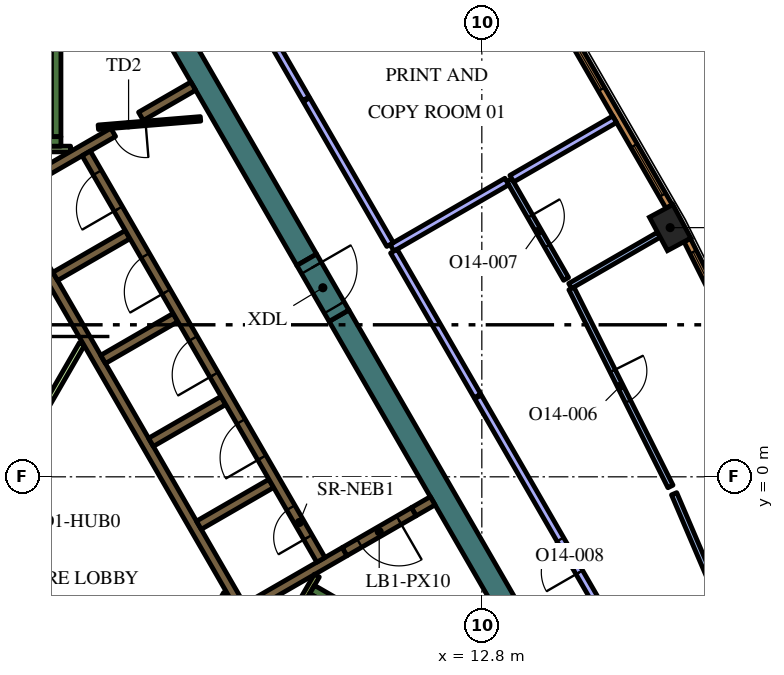
"""IFC4 building model, lengths in metres.
Left out: names, types, materials, properties, quantities, classifications, styles, units other than length and angle.
Written with IfcOpenShell. Run it as: python <this file> out.ifc"""

import sys

from ifc_helpers import new_model, si_unit, direction, frame, frame_2d, origin, origin_2d, place, context, subcontext, project, spatial, rectangle, extrude, element, fill, save


model = new_model("IFC4")
c1 = context("Model", 3, precision=1e-05, world=origin(), true_north=direction((0.0, 1.0)))
c2 = subcontext(c1, "Body", "Model", "MODEL_VIEW")
j1 = project(units=[si_unit("LENGTHUNIT", "METRE"), si_unit("PLANEANGLEUNIT", "RADIAN")], contexts=[c1])
p1 = place(None, origin())
s1 = spatial("IfcSite", under=j1, at=p1, CompositionType="ELEMENT")
p2 = place(p1, origin())
s2 = spatial("IfcBuilding", under=s1, at=p2, CompositionType="ELEMENT")
p3 = place(p2, frame((0.0, 0.0, 309.0)))
s3 = spatial("IfcBuildingStorey", under=s2, at=p3, CompositionType="ELEMENT", Elevation=309.0)
p4 = place(p3, frame((17.756, 6.557, 0.0), z_axis=(0.0, 0.0, 1.0), x_axis=(-0.473945287575, 0.880554293832, 0.0)))
e1 = element("IfcColumn", 1, at=p4, inside=s3, PredefinedType="COLUMN", context=c2, shape_type="SweptSolid", body=[
    extrude(rectangle(XDim=1.0, YDim=0.7, at=origin_2d()), origin(), (0.0, 0.0, 1.0), 4.2),
])
for number, where, z_axis, x_axis in (
    (2, (9.042, 4.239, 0.0), (0.0, 0.0, 1.0), (0.5, -0.866, 0.0)),
    (3, (1.989, 16.456, 0.0), (0.0, 0.0, 1.0), (0.5, -0.866, 0.0)),
):
    element("IfcWall", number, at=place(p3, frame(where, z_axis=z_axis, x_axis=x_axis)), inside=s3, PredefinedType="SOLIDWALL", context=c2, shape_type="SweptSolid", body=[
        extrude(rectangle(XDim=12.406, YDim=0.6, at=frame_2d((6.203, 0.0))), origin(), (0.0, 0.0, 1.0), 4.2),
    ])
p5 = place(p3, frame((8.334, -2.964, 0.0), z_axis=(0.0, 0.0, 1.0), x_axis=(0.866016039709, -0.500016218704, 0.0)))
e4 = element("IfcWall", 4, at=p5, inside=s3, PredefinedType="SOLIDWALL", context=c2, shape_type="SweptSolid", body=[
    extrude(rectangle(XDim=7.05, YDim=0.25, at=frame_2d((3.525, 0.0))), origin(), (0.0, 0.0, 1.0), 4.2),
])
p6 = place(p3, frame((8.168, -3.503, 0.0), z_axis=(0.0, 0.0, 1.0), x_axis=(0.49972245349, 0.866185586049, 0.0)))
e5 = element("IfcWall", 5, at=p6, inside=s3, PredefinedType="SOLIDWALL", context=c2, shape_type="SweptSolid", body=[
    extrude(rectangle(XDim=0.425, YDim=0.25, at=frame_2d((0.212, 0.0))), origin(), (0.0, 0.0, 1.0), 4.2),
])
p7 = place(p3, frame((1.6, 8.95, 0.0), z_axis=(0.0, 0.0, 1.0), x_axis=(0.0, 1.0, 0.0)))
e6 = element("IfcWall", 6, at=p7, inside=s3, PredefinedType="SOLIDWALL", context=c2, shape_type="SweptSolid", body=[
    extrude(rectangle(XDim=6.8, YDim=0.25, at=frame_2d((3.4, 0.0))), origin(), (0.0, 0.0, 1.0), 4.2),
])
p8 = place(p3, frame((1.05, 8.825, 0.0), z_axis=(0.0, 0.0, 1.0), x_axis=(1.0, 0.0, 0.0)))
e7 = element("IfcWall", 7, at=p8, inside=s3, PredefinedType="SOLIDWALL", context=c2, shape_type="SweptSolid", body=[
    extrude(rectangle(XDim=0.675, YDim=0.25, at=frame_2d((0.337, 0.0))), origin(), (0.0, 0.0, 1.0), 4.2),
])
p9 = place(p3, frame((11.507, -0.631, 0.0), z_axis=(0.0, 0.0, 1.0), x_axis=(-0.866093731455, -0.499881634324, 0.0)))
e8 = element("IfcWall", 8, at=p9, inside=s3, PredefinedType="SOLIDWALL", context=c2, shape_type="SweptSolid", body=[
    extrude(rectangle(XDim=0.575, YDim=0.25, at=frame_2d((0.288, 0.0))), origin(), (0.0, 0.0, 1.0), 4.2),
])
p10 = place(p3, frame((6.568, -3.627, 0.0), z_axis=(0.0, 0.0, 1.0), x_axis=(-0.499999455981, 0.866025717874, 0.0)))
e9 = element("IfcWall", 9, at=p10, inside=s3, PredefinedType="SOLIDWALL", context=c2, shape_type="SweptSolid", body=[
    extrude(rectangle(XDim=11.978, YDim=0.25, at=frame_2d((5.989, 0.0))), origin(), (0.0, 0.0, 1.0), 4.2),
])
p11 = place(p3, frame((3.1, 9.064, 0.0), z_axis=(0.0, 0.0, 1.0), x_axis=(-0.866030133475, -0.499991807846, 0.0)))
e10 = element("IfcWall", 10, at=p11, inside=s3, PredefinedType="SOLIDWALL", context=c2, shape_type="SweptSolid", body=[
    extrude(rectangle(XDim=3.217, YDim=0.25, at=frame_2d((1.608, 0.0))), origin(), (0.0, 0.0, 1.0), 4.2),
])
p12 = place(p3, frame((1.574, 5.274, 0.0), z_axis=(0.0, 0.0, 1.0), x_axis=(0.866028486751, 0.499994660107, 0.0)))
e11 = element("IfcWall", 11, at=p12, inside=s3, PredefinedType="SOLIDWALL", context=c2, shape_type="SweptSolid", body=[
    extrude(rectangle(XDim=2.2, YDim=0.25, at=frame_2d((1.1, 0.0))), origin(), (0.0, 0.0, 1.0), 4.2),
])
for number, where, z_axis, x_axis in (
    (12, (2.834, 3.091, 0.0), (0.0, 0.0, 1.0), (0.866, 0.5, 0.0)),
    (13, (4.094, 0.909, 0.0), (0.0, 0.0, 1.0), (0.866, 0.5, 0.0)),
    (14, (5.354, -1.274, 0.0), (0.0, 0.0, 1.0), (0.866, 0.5, 0.0)),
):
    element("IfcWall", number, at=place(p3, frame(where, z_axis=z_axis, x_axis=x_axis)), inside=s3, PredefinedType="SOLIDWALL", context=c2, shape_type="SweptSolid", body=[
        extrude(rectangle(XDim=2.2, YDim=0.25, at=frame_2d((1.1, 0.0))), origin(), (0.0, 0.0, 1.0), 4.2),
    ])
p13 = place(p3, frame((6.614, -3.456, 0.0), z_axis=(0.0, 0.0, 1.0), x_axis=(0.866032512851, 0.499987686533, 0.0)))
e15 = element("IfcWall", 15, at=p13, inside=s3, PredefinedType="SOLIDWALL", context=c2, shape_type="SweptSolid", body=[
    extrude(rectangle(XDim=2.975, YDim=0.25, at=frame_2d((1.487, 0.0))), origin(), (0.0, 0.0, 1.0), 4.2),
])
p14 = place(p3, frame((3.83, 9.486, 0.0), z_axis=(0.0, 0.0, 1.0), x_axis=(0.865986202621, 0.500067892261, 0.0)))
e16 = element("IfcWall", 16, at=p14, inside=s3, PredefinedType="SOLIDWALL", context=c2, shape_type="SweptSolid", body=[
    extrude(rectangle(XDim=1.591, YDim=0.25, at=frame_2d((0.795, 0.0))), origin(), (0.0, 0.0, 1.0), 4.2),
])
p15 = place(p3, frame((1.05, 8.625, 0.0), z_axis=(0.0, 0.0, 1.0), x_axis=(1.0, 0.0, 0.0)))
e17 = element("IfcWall", 17, at=p15, inside=s3, PredefinedType="PARTITIONING", context=c2, shape_type="SweptSolid", body=[
    extrude(rectangle(XDim=0.929, YDim=0.15, at=frame_2d((0.464, 0.0))), origin(), (0.0, 0.0, 1.0), 3.55),
])
p16 = place(p3, frame((8.459, -2.599, 0.0), z_axis=(0.0, 0.0, 1.0), x_axis=(-0.500041054325, -0.866001699761, 0.0)))
e18 = element("IfcWall", 18, at=p16, inside=s3, PredefinedType="PARTITIONING", context=c2, shape_type="SweptSolid", body=[
    extrude(rectangle(XDim=0.929, YDim=0.15, at=frame_2d((0.464, 0.0))), origin(), (0.0, 0.0, 1.0), 4.2),
])
p17 = place(p3, frame((5.705, -3.718, 0.0), z_axis=(0.0, 0.0, 1.0), x_axis=(0.499962090823, 0.866047289552, 0.0)))
e19 = element("IfcWall", 19, at=p17, inside=s3, PredefinedType="PARTITIONING", context=c2, shape_type="SweptSolid", body=[
    extrude(rectangle(XDim=0.735, YDim=0.15, at=frame_2d((0.367, 0.0))), origin(), (0.0, 0.0, 1.0), 3.55),
])
p18 = place(p3, frame((0.72, 0.797, 0.0), z_axis=(0.0, 0.0, 1.0), x_axis=(0.499984921984, 0.866034108906, 0.0)))
e20 = element("IfcWall", 20, at=p18, inside=s3, PredefinedType="PARTITIONING", context=c2, shape_type="SweptSolid", body=[
    extrude(rectangle(XDim=3.113, YDim=0.15, at=frame_2d((1.557, 0.0))), origin(), (0.0, 0.0, 1.0), 3.55),
])
p19 = place(p3, frame((8.565, -2.185, 0.0), z_axis=(0.0, 0.0, 1.0), x_axis=(-0.499997954832, 0.866026584559, 0.0)))
e21 = element("IfcWall", 21, at=p19, inside=s3, PredefinedType="SOLIDWALL", context=c2, shape_type="SweptSolid", body=[
    extrude(rectangle(XDim=12.35, YDim=0.25, at=frame_2d((6.175, 0.0))), origin(), (0.0, 0.0, 1.0), 4.2),
])
p20 = place(p19, frame((0.685, 0.0, 0.0)))
e22 = element("IfcOpeningElement", 22, at=p20, cuts=e21, PredefinedType="OPENING", context=c2, shape_type="SweptSolid", body=[
    extrude(rectangle(XDim=0.9, YDim=2.1, at=frame_2d((0.45, 1.05))), frame((0.0, 0.135, 0.0), z_axis=(0.0, -1.0, 0.0), x_axis=(1.0, 0.0, 0.0)), (0.0, 0.0, 1.0), 0.27),
])
p21 = place(p19, frame((3.105, 0.0, 0.0)))
e23 = element("IfcOpeningElement", 23, at=p21, cuts=e21, PredefinedType="OPENING", context=c2, shape_type="SweptSolid", body=[
    extrude(rectangle(XDim=1.1, YDim=2.1, at=frame_2d((0.55, 1.05))), frame((0.0, 0.135, 0.0), z_axis=(0.0, -1.0, 0.0), x_axis=(1.0, 0.0, 0.0)), (0.0, 0.0, 1.0), 0.27),
])
p22 = place(p19, frame((5.625, 0.0, 0.0)))
e24 = element("IfcOpeningElement", 24, at=p22, cuts=e21, PredefinedType="OPENING", context=c2, shape_type="SweptSolid", body=[
    extrude(rectangle(XDim=1.1, YDim=2.1, at=frame_2d((0.55, 1.05))), frame((0.0, 0.135, 0.0), z_axis=(0.0, -1.0, 0.0), x_axis=(1.0, 0.0, 0.0)), (0.0, 0.0, 1.0), 0.27),
])
p23 = place(p19, frame((8.145, 0.0, 0.0)))
e25 = element("IfcOpeningElement", 25, at=p23, cuts=e21, PredefinedType="OPENING", context=c2, shape_type="SweptSolid", body=[
    extrude(rectangle(XDim=1.1, YDim=2.1, at=frame_2d((0.55, 1.05))), frame((0.0, 0.135, 0.0), z_axis=(0.0, -1.0, 0.0), x_axis=(1.0, 0.0, 0.0)), (0.0, 0.0, 1.0), 0.27),
])
p24 = place(p19, frame((10.665, 0.0, 0.0)))
e26 = element("IfcOpeningElement", 26, at=p24, cuts=e21, PredefinedType="OPENING", context=c2, shape_type="SweptSolid", body=[
    extrude(rectangle(XDim=1.1, YDim=2.1, at=frame_2d((0.55, 1.05))), frame((0.0, 0.135, 0.0), z_axis=(0.0, -1.0, 0.0), x_axis=(1.0, 0.0, 0.0)), (0.0, 0.0, 1.0), 0.27),
])
p25 = place(p3, frame((5.398, 9.419, 0.0), z_axis=(0.0, 0.0, 1.0), x_axis=(-0.996653416376, -0.081743303248, 0.0)))
e27 = element("IfcWall", 27, at=p25, inside=s3, PredefinedType="PARTITIONING", context=c2, shape_type="SweptSolid", body=[
    extrude(rectangle(XDim=2.7, YDim=0.12, at=frame_2d((1.35, 0.0))), origin(), (0.0, 0.0, 1.0), 3.55),
])
p26 = place(p25, frame((1.45, 0.0, 0.0)))
e28 = element("IfcOpeningElement", 28, at=p26, cuts=e27, PredefinedType="OPENING", context=c2, shape_type="SweptSolid", body=[
    extrude(rectangle(XDim=0.9, YDim=2.1, at=frame_2d((0.45, 1.05))), frame((0.0, 0.07, 0.0), z_axis=(0.0, -1.0, 0.0), x_axis=(1.0, 0.0, 0.0)), (0.0, 0.0, 1.0), 0.14),
])
p27 = place(p3, frame((11.009, -0.919, 0.0), z_axis=(0.0, 0.0, 1.0), x_axis=(-0.866059744384, -0.49994051562, 0.0)))
e29 = element("IfcWall", 29, at=p27, inside=s3, PredefinedType="SOLIDWALL", context=c2, shape_type="SweptSolid", body=[
    extrude(rectangle(XDim=2.1, YDim=0.25, at=frame_2d((1.05, 0.0))), origin(), (0.0, 0.0, 1.0), 4.2),
])
p28 = place(p27, frame((0.45, 0.0, 0.0)))
e30 = element("IfcOpeningElement", 30, at=p28, cuts=e29, PredefinedType="OPENING", context=c2, shape_type="SweptSolid", body=[
    extrude(rectangle(XDim=1.2, YDim=2.1, at=frame_2d((0.6, 1.05))), frame((0.0, 0.135, 0.0), z_axis=(0.0, -1.0, 0.0), x_axis=(1.0, 0.0, 0.0)), (0.0, 0.0, 1.0), 0.27),
])
p29 = place(p3, frame((8.192, 5.711, 0.0), z_axis=(0.0, 0.0, 1.0), x_axis=(0.500062241894, -0.865989465428, 0.0)))
e31 = element("IfcWall", 31, at=p29, inside=s3, PredefinedType="SOLIDWALL", context=c2, shape_type="SweptSolid", body=[
    extrude(rectangle(XDim=1.7, YDim=0.6, at=frame_2d((0.85, 0.0))), origin(), (0.0, 0.0, 1.0), 4.2),
])
p30 = place(p29, frame((0.25, 0.0, 0.0)))
e32 = element("IfcOpeningElement", 32, at=p30, cuts=e31, PredefinedType="OPENING", context=c2, shape_type="SweptSolid", body=[
    extrude(rectangle(XDim=1.2, YDim=2.1, at=frame_2d((0.6, 1.05))), frame((0.0, 0.31, 0.0), z_axis=(0.0, -1.0, 0.0), x_axis=(1.0, 0.0, 0.0)), (0.0, 0.0, 1.0), 0.62),
])
p31 = place(p3, frame((15.124, 5.022, 0.0), z_axis=(0.0, 0.0, 1.0), x_axis=(0.866010629317, 0.500025589255, 0.0)))
e33 = element("IfcWall", 33, at=p31, inside=s3, PredefinedType="PARTITIONING", context=c2, shape_type="SweptSolid", body=[
    extrude(rectangle(XDim=2.696, YDim=0.15, at=frame_2d((1.348, 0.0))), origin(), (0.0, 0.0, 1.0), 3.55),
])
p32 = place(p3, frame((19.226, -3.639, 0.0), z_axis=(0.0, 0.0, 1.0), x_axis=(-0.393350933662, 0.919388407033, 0.0)))
e34 = element("IfcWall", 34, at=p32, inside=s3, PredefinedType="PARTITIONING", context=c2, shape_type="SweptSolid", body=[
    extrude(rectangle(XDim=3.474, YDim=0.15, at=frame_2d((1.737, 0.0))), origin(), (0.0, 0.0, 1.0), 3.55),
])
p33 = place(p3, frame((15.158, 4.955, 0.0), z_axis=(0.0, 0.0, 1.0), x_axis=(0.447465104013, -0.894301392535, 0.0)))
e35 = element("IfcWall", 35, at=p33, inside=s3, PredefinedType="PARTITIONING", context=c2, shape_type="SweptSolid", body=[
    extrude(rectangle(XDim=5.824, YDim=0.15, at=frame_2d((2.912, 0.0))), origin(), (0.0, 0.0, 1.0), 3.55),
])
p34 = place(p33, frame((2.424, 0.0, 0.0)))
e36 = element("IfcOpeningElement", 36, at=p34, cuts=e35, PredefinedType="OPENING", context=c2, shape_type="SweptSolid", body=[
    extrude(rectangle(XDim=0.9, YDim=2.1, at=frame_2d((0.45, 1.05))), frame((0.0, 0.085, 0.0), z_axis=(0.0, -1.0, 0.0), x_axis=(1.0, 0.0, 0.0)), (0.0, 0.0, 1.0), 0.17),
])
p35 = place(p3, frame((13.523, 7.808, 0.0), z_axis=(0.0, 0.0, 1.0), x_axis=(0.498338040698, -0.866982812513, 0.0)))
e37 = element("IfcWall", 37, at=p35, inside=s3, PredefinedType="PARTITIONING", context=c2, shape_type="SweptSolid", body=[
    extrude(rectangle(XDim=2.999, YDim=0.15, at=frame_2d((1.5, 0.0))), origin(), (0.0, 0.0, 1.0), 3.55),
])
p36 = place(p35, frame((1.099, 0.0, 0.0)))
e38 = element("IfcOpeningElement", 38, at=p36, cuts=e37, PredefinedType="OPENING", context=c2, shape_type="SweptSolid", body=[
    extrude(rectangle(XDim=0.9, YDim=2.1, at=frame_2d((0.45, 1.05))), frame((0.0, 0.085, 0.0), z_axis=(0.0, -1.0, 0.0), x_axis=(1.0, 0.0, 0.0)), (0.0, 0.0, 1.0), 0.17),
])
p37 = place(p3, frame((13.588, 7.845, 0.0), z_axis=(0.0, 0.0, 1.0), x_axis=(0.866022959057, 0.500004234368, 0.0)))
e39 = element("IfcWall", 39, at=p37, inside=s3, PredefinedType="PARTITIONING", context=c2, shape_type="SweptSolid", body=[
    extrude(rectangle(XDim=3.125, YDim=0.2, at=frame_2d((1.562, 0.0))), origin(), (0.0, 0.0, 1.0), 3.55),
])
p38 = place(p3, frame((10.436, 6.025, 0.0), z_axis=(0.0, 0.0, 1.0), x_axis=(0.866030664334, 0.49999088835, 0.0)))
e40 = element("IfcWall", 40, at=p38, inside=s3, PredefinedType="PARTITIONING", context=c2, shape_type="SweptSolid", body=[
    extrude(rectangle(XDim=3.49, YDim=0.2, at=frame_2d((1.745, 0.0))), origin(), (0.0, 0.0, 1.0), 3.55),
])
p39 = place(p3, frame((12.686, 2.128, 0.0), z_axis=(0.0, 0.0, 1.0), x_axis=(-0.499988222896, 0.866032203192, 0.0)))
e41 = element("IfcWall", 41, at=p39, inside=s3, PredefinedType="PARTITIONING", context=c2, shape_type="SweptSolid", body=[
    extrude(rectangle(XDim=4.4, YDim=0.2, at=frame_2d((2.2, 0.0))), origin(), (0.0, 0.0, 1.0), 3.55),
])
p40 = place(p3, frame((17.565, -6.324, 0.0), z_axis=(0.0, 0.0, 1.0), x_axis=(-0.499990354792, 0.866030972376, 0.0)))
e42 = element("IfcWall", 42, at=p40, inside=s3, PredefinedType="PARTITIONING", context=c2, shape_type="SweptSolid", body=[
    extrude(rectangle(XDim=9.729, YDim=0.2, at=frame_2d((4.865, 0.0))), origin(), (0.0, 0.0, 1.0), 3.55),
])
p41 = place(p40, frame((4.4, 0.0, 0.0)))
e43 = element("IfcOpeningElement", 43, at=p41, cuts=e42, PredefinedType="OPENING", context=c2, shape_type="SweptSolid", body=[
    extrude(rectangle(XDim=1.0, YDim=2.1, at=frame_2d((0.5, 1.05))), frame((0.0, 0.11, 0.0), z_axis=(0.0, -1.0, 0.0), x_axis=(1.0, 0.0, 0.0)), (0.0, 0.0, 1.0), 0.22),
])
p42 = place(p3, frame((10.385, 6.112, 0.0), z_axis=(0.0, 0.0, 1.0), x_axis=(-0.499988222896, 0.866032203192, 0.0)))
e44 = element("IfcWall", 44, at=p42, inside=s3, PredefinedType="PARTITIONING", context=c2, shape_type="SweptSolid", body=[
    extrude(rectangle(XDim=4.4, YDim=0.2, at=frame_2d((2.2, 0.0))), origin(), (0.0, 0.0, 1.0), 3.55),
])
p43 = place(p3, frame((8.171, 9.948, 0.0), z_axis=(0.0, 0.0, 1.0), x_axis=(-0.500044545065, 0.865999684151, 0.0)))
e45 = element("IfcWall", 45, at=p43, inside=s3, PredefinedType="PARTITIONING", context=c2, shape_type="SweptSolid", body=[
    extrude(rectangle(XDim=1.815, YDim=0.2, at=frame_2d((0.908, 0.0))), origin(), (0.0, 0.0, 1.0), 3.55),
])
p44 = place(p3, frame((20.625, 1.392, 0.0), z_axis=(0.0, 0.0, 1.0), x_axis=(-0.447484531401, 0.894291671747, 0.0)))
e46 = element("IfcWall", 46, at=p44, inside=s3, PredefinedType="SOLIDWALL", context=c2, shape_type="SweptSolid", body=[
    extrude(rectangle(XDim=5.406, YDim=0.19, at=frame_2d((2.703, 0.0))), origin(), (0.0, 0.0, 1.0), 3.95),
])
p45 = place(p44, frame((0.346, 0.0, 0.6)))
e47 = element("IfcOpeningElement", 47, at=p45, cuts=e46, PredefinedType="OPENING", context=c2, shape_type="SweptSolid", body=[
    extrude(rectangle(XDim=1.5, YDim=2.85, at=frame_2d((0.75, 1.425))), frame((0.0, 0.105, 0.0), z_axis=(0.0, -1.0, 0.0), x_axis=(1.0, 0.0, 0.0)), (0.0, 0.0, 1.0), 0.21),
])
p46 = place(p44, frame((3.559, 0.0, 0.6)))
e48 = element("IfcOpeningElement", 48, at=p46, cuts=e46, PredefinedType="OPENING", context=c2, shape_type="SweptSolid", body=[
    extrude(rectangle(XDim=1.5, YDim=2.85, at=frame_2d((0.75, 1.425))), frame((0.0, 0.105, 0.0), z_axis=(0.0, -1.0, 0.0), x_axis=(1.0, 0.0, 0.0)), (0.0, 0.0, 1.0), 0.21),
])
p47 = place(p3, frame((17.728, 7.114, 0.0), z_axis=(0.0, 0.0, 1.0), x_axis=(-0.500024767483, 0.866011103799, 0.0)))
e49 = element("IfcWall", 49, at=p47, inside=s3, PredefinedType="SOLIDWALL", context=c2, shape_type="SweptSolid", body=[
    extrude(rectangle(XDim=5.406, YDim=0.19, at=frame_2d((2.703, 0.0))), origin(), (0.0, 0.0, 1.0), 3.95),
])
p48 = place(p47, frame((0.346, 0.0, 0.6)))
e50 = element("IfcOpeningElement", 50, at=p48, cuts=e49, PredefinedType="OPENING", context=c2, shape_type="SweptSolid", body=[
    extrude(rectangle(XDim=1.5, YDim=2.85, at=frame_2d((0.75, 1.425))), frame((0.0, 0.105, 0.0), z_axis=(0.0, -1.0, 0.0), x_axis=(1.0, 0.0, 0.0)), (0.0, 0.0, 1.0), 0.21),
])
p49 = place(p47, frame((3.56, 0.0, 0.6)))
e51 = element("IfcOpeningElement", 51, at=p49, cuts=e49, PredefinedType="OPENING", context=c2, shape_type="SweptSolid", body=[
    extrude(rectangle(XDim=1.5, YDim=2.85, at=frame_2d((0.75, 1.425))), frame((0.0, 0.105, 0.0), z_axis=(0.0, -1.0, 0.0), x_axis=(1.0, 0.0, 0.0)), (0.0, 0.0, 1.0), 0.21),
])
p50 = place(p20, origin())
e52 = element("IfcDoor", 52, at=p50, inside=s3, OperationType="SINGLE_SWING_LEFT", PredefinedType="DOOR", context=c2, shape_type="SweptSolid", body=[
    extrude(rectangle(XDim=0.9, YDim=2.1, at=frame_2d((0.45, 1.05))), frame((0.0, 0.025, 0.0), z_axis=(0.0, -1.0, 0.0), x_axis=(1.0, 0.0, 0.0)), (0.0, 0.0, 1.0), 0.05),
])
fill(e22, e52)
p51 = place(p21, origin())
e53 = element("IfcDoor", 53, at=p51, inside=s3, OperationType="DOUBLE_DOOR_SLIDING", PredefinedType="DOOR", context=c2, shape_type="SweptSolid", body=[
    extrude(rectangle(XDim=1.1, YDim=2.1, at=frame_2d((0.55, 1.05))), frame((0.0, 0.025, 0.0), z_axis=(0.0, -1.0, 0.0), x_axis=(1.0, 0.0, 0.0)), (0.0, 0.0, 1.0), 0.05),
])
fill(e23, e53)
p52 = place(p22, origin())
e54 = element("IfcDoor", 54, at=p52, inside=s3, OperationType="DOUBLE_DOOR_SLIDING", PredefinedType="DOOR", context=c2, shape_type="SweptSolid", body=[
    extrude(rectangle(XDim=1.1, YDim=2.1, at=frame_2d((0.55, 1.05))), frame((0.0, 0.025, 0.0), z_axis=(0.0, -1.0, 0.0), x_axis=(1.0, 0.0, 0.0)), (0.0, 0.0, 1.0), 0.05),
])
fill(e24, e54)
p53 = place(p23, origin())
e55 = element("IfcDoor", 55, at=p53, inside=s3, OperationType="DOUBLE_DOOR_SLIDING", PredefinedType="DOOR", context=c2, shape_type="SweptSolid", body=[
    extrude(rectangle(XDim=1.1, YDim=2.1, at=frame_2d((0.55, 1.05))), frame((0.0, 0.025, 0.0), z_axis=(0.0, -1.0, 0.0), x_axis=(1.0, 0.0, 0.0)), (0.0, 0.0, 1.0), 0.05),
])
fill(e25, e55)
p54 = place(p24, origin())
e56 = element("IfcDoor", 56, at=p54, inside=s3, OperationType="DOUBLE_DOOR_SLIDING", PredefinedType="DOOR", context=c2, shape_type="SweptSolid", body=[
    extrude(rectangle(XDim=1.1, YDim=2.1, at=frame_2d((0.55, 1.05))), frame((0.0, 0.025, 0.0), z_axis=(0.0, -1.0, 0.0), x_axis=(1.0, 0.0, 0.0)), (0.0, 0.0, 1.0), 0.05),
])
fill(e26, e56)
p55 = place(p26, origin())
e57 = element("IfcDoor", 57, at=p55, inside=s3, OperationType="SINGLE_SWING_LEFT", PredefinedType="DOOR", context=c2, shape_type="SweptSolid", body=[
    extrude(rectangle(XDim=0.9, YDim=2.1, at=frame_2d((0.45, 1.05))), frame((0.0, 0.025, 0.0), z_axis=(0.0, -1.0, 0.0), x_axis=(1.0, 0.0, 0.0)), (0.0, 0.0, 1.0), 0.05),
])
fill(e28, e57)
p56 = place(p28, origin())
e58 = element("IfcDoor", 58, at=p56, inside=s3, OperationType="SINGLE_SWING_LEFT", PredefinedType="DOOR", context=c2, shape_type="SweptSolid", body=[
    extrude(rectangle(XDim=1.2, YDim=2.1, at=frame_2d((0.6, 1.05))), frame((0.0, 0.025, 0.0), z_axis=(0.0, -1.0, 0.0), x_axis=(1.0, 0.0, 0.0)), (0.0, 0.0, 1.0), 0.05),
])
fill(e30, e58)
p57 = place(p30, origin())
e59 = element("IfcDoor", 59, at=p57, inside=s3, OperationType="SINGLE_SWING_LEFT", PredefinedType="DOOR", context=c2, shape_type="SweptSolid", body=[
    extrude(rectangle(XDim=1.2, YDim=2.1, at=frame_2d((0.6, 1.05))), frame((0.0, 0.025, 0.0), z_axis=(0.0, -1.0, 0.0), x_axis=(1.0, 0.0, 0.0)), (0.0, 0.0, 1.0), 0.05),
])
fill(e32, e59)
p58 = place(p34, origin())
e60 = element("IfcDoor", 60, at=p58, inside=s3, OperationType="SINGLE_SWING_LEFT", PredefinedType="DOOR", context=c2, shape_type="SweptSolid", body=[
    extrude(rectangle(XDim=0.9, YDim=2.1, at=frame_2d((0.45, 1.05))), frame((0.0, 0.025, 0.0), z_axis=(0.0, -1.0, 0.0), x_axis=(1.0, 0.0, 0.0)), (0.0, 0.0, 1.0), 0.05),
])
fill(e36, e60)
p59 = place(p36, origin())
e61 = element("IfcDoor", 61, at=p59, inside=s3, OperationType="SINGLE_SWING_RIGHT", PredefinedType="DOOR", context=c2, shape_type="SweptSolid", body=[
    extrude(rectangle(XDim=0.9, YDim=2.1, at=frame_2d((0.45, 1.05))), frame((0.0, 0.025, 0.0), z_axis=(0.0, -1.0, 0.0), x_axis=(1.0, 0.0, 0.0)), (0.0, 0.0, 1.0), 0.05),
])
fill(e38, e61)
p60 = place(p41, origin())
e62 = element("IfcDoor", 62, at=p60, inside=s3, OperationType="SINGLE_SWING_RIGHT", PredefinedType="DOOR", context=c2, shape_type="SweptSolid", body=[
    extrude(rectangle(XDim=1.0, YDim=2.1, at=frame_2d((0.5, 1.05))), frame((0.0, 0.025, 0.0), z_axis=(0.0, -1.0, 0.0), x_axis=(1.0, 0.0, 0.0)), (0.0, 0.0, 1.0), 0.05),
])
fill(e43, e62)
p61 = place(p46, origin())
e63 = element("IfcWindow", 63, at=p61, inside=s3, PartitioningType="SINGLE_PANEL", PredefinedType="WINDOW", context=c2, shape_type="SweptSolid", body=[
    extrude(rectangle(XDim=1.5, YDim=2.85, at=frame_2d((0.75, 1.425))), frame((0.0, 0.045, 0.0), z_axis=(0.0, -1.0, 0.0), x_axis=(1.0, 0.0, 0.0)), (0.0, 0.0, 1.0), 0.06),
])
fill(e48, e63)
p62 = place(p48, origin())
e64 = element("IfcWindow", 64, at=p62, inside=s3, PartitioningType="SINGLE_PANEL", PredefinedType="WINDOW", context=c2, shape_type="SweptSolid", body=[
    extrude(rectangle(XDim=1.5, YDim=2.85, at=frame_2d((0.75, 1.425))), frame((0.0, 0.045, 0.0), z_axis=(0.0, -1.0, 0.0), x_axis=(1.0, 0.0, 0.0)), (0.0, 0.0, 1.0), 0.06),
])
fill(e50, e64)
p63 = place(p49, origin())
e65 = element("IfcWindow", 65, at=p63, inside=s3, PartitioningType="SINGLE_PANEL", PredefinedType="WINDOW", context=c2, shape_type="SweptSolid", body=[
    extrude(rectangle(XDim=1.5, YDim=2.85, at=frame_2d((0.75, 1.425))), frame((0.0, 0.045, 0.0), z_axis=(0.0, -1.0, 0.0), x_axis=(1.0, 0.0, 0.0)), (0.0, 0.0, 1.0), 0.06),
])
fill(e51, e65)
save(model, sys.argv[1])
